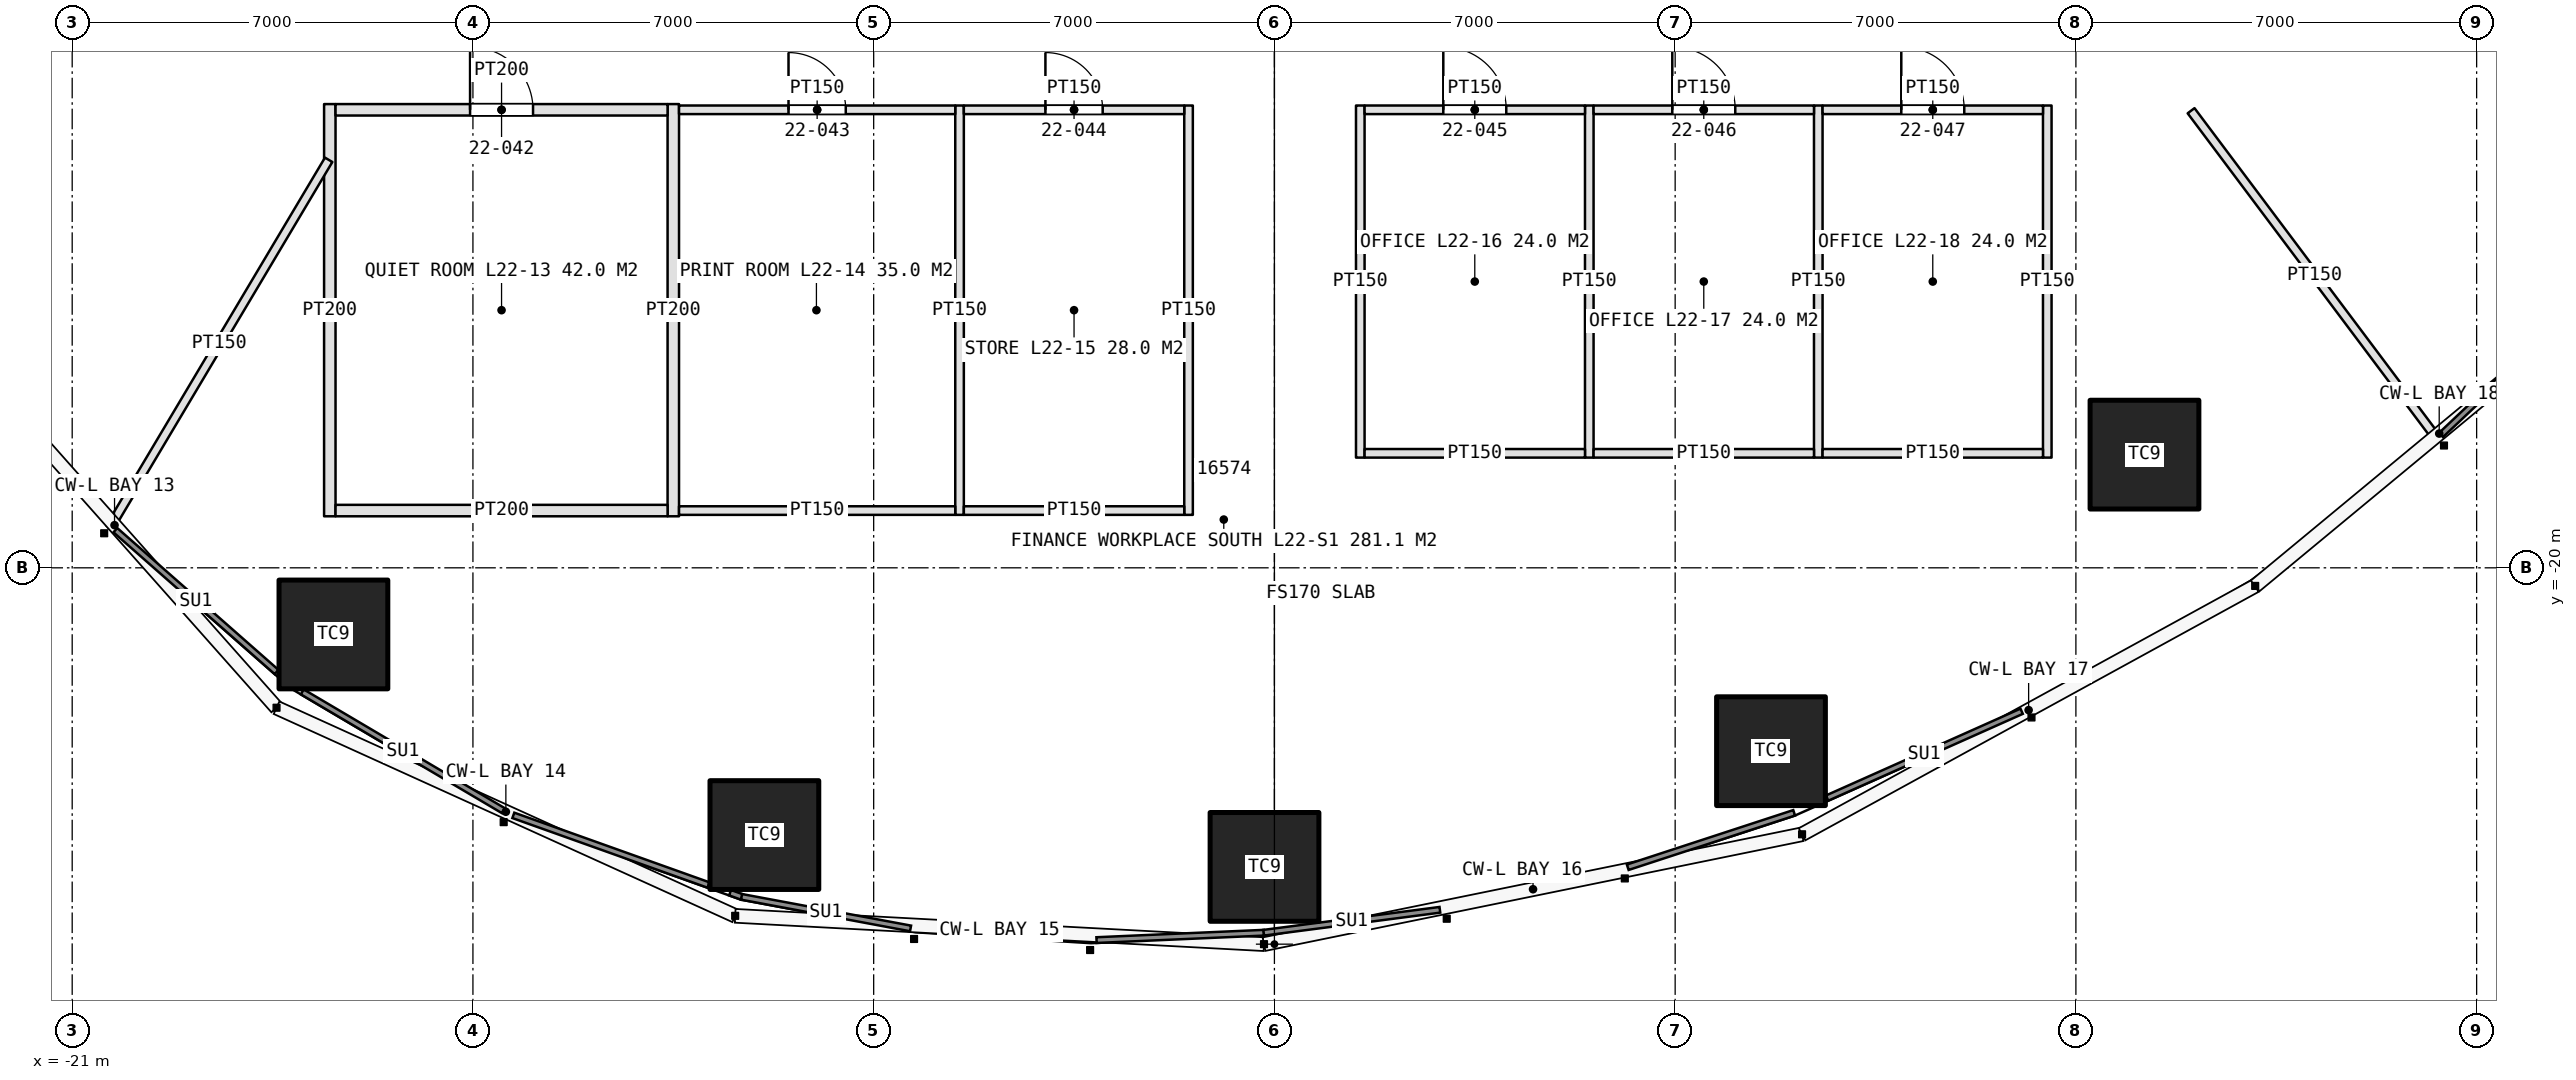
"""IFC4 building model, lengths in metres.
Left out: names, types, materials, properties, quantities, classifications, styles, units other than length and angle.
Written with IfcOpenShell. Run it as: python <this file> out.ifc"""

import sys

from ifc_helpers import new_model, si_unit, direction, frame, frame_2d, origin, origin_2d, place, context, subcontext, project, spatial, rectangle, extrude, element, fill, save


model = new_model("IFC4")
c1 = context("Model", 3, precision=1e-05, world=origin(), true_north=direction((0.0, 1.0)))
c2 = subcontext(c1, "Body", "Model", "MODEL_VIEW")
j1 = project(units=[si_unit("LENGTHUNIT", "METRE"), si_unit("PLANEANGLEUNIT", "RADIAN")], contexts=[c1])
p1 = place(None, origin())
s1 = spatial("IfcSite", under=j1, at=p1, CompositionType="ELEMENT")
p2 = place(p1, origin())
s2 = spatial("IfcBuilding", under=s1, at=p2, CompositionType="ELEMENT")
p3 = place(p2, frame((0.0, 0.0, 109.2)))
s3 = spatial("IfcBuildingStorey", under=s2, at=p3, CompositionType="ELEMENT", Elevation=109.2)
for number, where, z_axis, x_axis in (
    (1, (-16.437, -21.164, 0.0), (0.0, 0.0, 1.0), (1.0, 0.0, 0.0)),
    (2, (-8.909, -24.668, 0.0), (0.0, 0.0, 1.0), (1.0, 0.0, 0.0)),
    (3, (-0.173, -25.224, 0.0), (0.0, 0.0, 1.0), (1.0, 0.0, 0.0)),
    (4, (8.674, -23.203, 0.0), (0.0, 0.0, 1.0), (1.0, 0.0, 0.0)),
    (5, (15.198, -18.023, 0.0), (0.0, 0.0, 1.0), (1.0, 0.0, 0.0)),
):
    element("IfcColumn", number, at=place(p3, frame(where, z_axis=z_axis, x_axis=x_axis)), inside=s3, PredefinedType="COLUMN", context=c2, shape_type="SweptSolid", body=[
        extrude(rectangle(XDim=1.9, YDim=1.9, at=origin_2d()), origin(), (0.0, 0.0, 1.0), 4.2),
    ])
for number, where, z_axis, x_axis in (
    (6, (-16.5, -11.9, 0.0), (0.0, 0.0, 1.0), (0.0, -1.0, 0.0)),
    (7, (-10.5, -11.9, 0.0), (0.0, 0.0, 1.0), (0.0, -1.0, 0.0)),
):
    element("IfcWall", number, at=place(p3, frame(where, z_axis=z_axis, x_axis=x_axis)), inside=s3, PredefinedType="PARTITIONING", context=c2, shape_type="SweptSolid", body=[
        extrude(rectangle(XDim=7.2, YDim=0.2, at=frame_2d((3.6, 0.0))), origin(), (0.0, 0.0, 1.0), 3.0),
    ])
for number, where, z_axis, x_axis in (
    (8, (-5.5, -11.925, 0.0), (0.0, 0.0, 1.0), (0.0, -1.0, 0.0)),
    (9, (-1.5, -11.925, 0.0), (0.0, 0.0, 1.0), (0.0, -1.0, 0.0)),
):
    element("IfcWall", number, at=place(p3, frame(where, z_axis=z_axis, x_axis=x_axis)), inside=s3, PredefinedType="PARTITIONING", context=c2, shape_type="SweptSolid", body=[
        extrude(rectangle(XDim=7.15, YDim=0.15, at=frame_2d((3.575, 0.0))), origin(), (0.0, 0.0, 1.0), 3.0),
    ])
p4 = place(p3, frame((-16.4, -12.0, 0.0), z_axis=(0.0, 0.0, 1.0), x_axis=(1.0, 0.0, 0.0)))
e10 = element("IfcWall", 10, at=p4, inside=s3, PredefinedType="PARTITIONING", context=c2, shape_type="SweptSolid", body=[
    extrude(rectangle(XDim=5.8, YDim=0.2, at=frame_2d((2.9, 0.0))), origin(), (0.0, 0.0, 1.0), 3.0),
])
p5 = place(p4, frame((2.35, 0.0, 0.0)))
e11 = element("IfcOpeningElement", 11, at=p5, cuts=e10, PredefinedType="OPENING", context=c2, shape_type="SweptSolid", body=[
    extrude(rectangle(XDim=1.1, YDim=2.3, at=frame_2d((0.55, 1.15))), frame((0.0, 0.11, 0.0), z_axis=(0.0, -1.0, 0.0), x_axis=(1.0, 0.0, 0.0)), (0.0, 0.0, 1.0), 0.22),
])
p6 = place(p3, frame((-16.4, -19.0, 0.0), z_axis=(0.0, 0.0, 1.0), x_axis=(1.0, 0.0, 0.0)))
e12 = element("IfcWall", 12, at=p6, inside=s3, PredefinedType="PARTITIONING", context=c2, shape_type="SweptSolid", body=[
    extrude(rectangle(XDim=5.8, YDim=0.2, at=frame_2d((2.9, 0.0))), origin(), (0.0, 0.0, 1.0), 3.0),
])
p7 = place(p3, frame((-10.4, -12.0, 0.0), z_axis=(0.0, 0.0, 1.0), x_axis=(1.0, 0.0, 0.0)))
e13 = element("IfcWall", 13, at=p7, inside=s3, PredefinedType="PARTITIONING", context=c2, shape_type="SweptSolid", body=[
    extrude(rectangle(XDim=4.825, YDim=0.15, at=frame_2d((2.413, 0.0))), origin(), (0.0, 0.0, 1.0), 3.0),
])
p8 = place(p7, frame((1.913, 0.0, 0.0)))
e14 = element("IfcOpeningElement", 14, at=p8, cuts=e13, PredefinedType="OPENING", context=c2, shape_type="SweptSolid", body=[
    extrude(rectangle(XDim=1.0, YDim=2.2, at=frame_2d((0.5, 1.1))), frame((0.0, 0.085, 0.0), z_axis=(0.0, -1.0, 0.0), x_axis=(1.0, 0.0, 0.0)), (0.0, 0.0, 1.0), 0.17),
])
p9 = place(p3, frame((-10.4, -19.0, 0.0), z_axis=(0.0, 0.0, 1.0), x_axis=(1.0, 0.0, 0.0)))
e15 = element("IfcWall", 15, at=p9, inside=s3, PredefinedType="PARTITIONING", context=c2, shape_type="SweptSolid", body=[
    extrude(rectangle(XDim=4.825, YDim=0.15, at=frame_2d((2.413, 0.0))), origin(), (0.0, 0.0, 1.0), 3.0),
])
p10 = place(p3, frame((-5.425, -12.0, 0.0), z_axis=(0.0, 0.0, 1.0), x_axis=(1.0, 0.0, 0.0)))
e16 = element("IfcWall", 16, at=p10, inside=s3, PredefinedType="PARTITIONING", context=c2, shape_type="SweptSolid", body=[
    extrude(rectangle(XDim=3.85, YDim=0.15, at=frame_2d((1.925, 0.0))), origin(), (0.0, 0.0, 1.0), 3.0),
])
p11 = place(p10, frame((1.425, 0.0, 0.0)))
e17 = element("IfcOpeningElement", 17, at=p11, cuts=e16, PredefinedType="OPENING", context=c2, shape_type="SweptSolid", body=[
    extrude(rectangle(XDim=1.0, YDim=2.2, at=frame_2d((0.5, 1.1))), frame((0.0, 0.085, 0.0), z_axis=(0.0, -1.0, 0.0), x_axis=(1.0, 0.0, 0.0)), (0.0, 0.0, 1.0), 0.17),
])
p12 = place(p3, frame((-5.425, -19.0, 0.0), z_axis=(0.0, 0.0, 1.0), x_axis=(1.0, 0.0, 0.0)))
e18 = element("IfcWall", 18, at=p12, inside=s3, PredefinedType="PARTITIONING", context=c2, shape_type="SweptSolid", body=[
    extrude(rectangle(XDim=3.85, YDim=0.15, at=frame_2d((1.925, 0.0))), origin(), (0.0, 0.0, 1.0), 3.0),
])
for number, where, z_axis, x_axis in (
    (19, (1.5, -11.925, 0.0), (0.0, 0.0, 1.0), (0.0, -1.0, 0.0)),
    (20, (5.5, -11.925, 0.0), (0.0, 0.0, 1.0), (0.0, -1.0, 0.0)),
    (21, (9.5, -11.925, 0.0), (0.0, 0.0, 1.0), (0.0, -1.0, 0.0)),
    (22, (13.5, -11.925, 0.0), (0.0, 0.0, 1.0), (0.0, -1.0, 0.0)),
):
    element("IfcWall", number, at=place(p3, frame(where, z_axis=z_axis, x_axis=x_axis)), inside=s3, PredefinedType="PARTITIONING", context=c2, shape_type="SweptSolid", body=[
        extrude(rectangle(XDim=6.15, YDim=0.15, at=frame_2d((3.075, 0.0))), origin(), (0.0, 0.0, 1.0), 3.0),
    ])
p13 = place(p3, frame((1.575, -12.0, 0.0), z_axis=(0.0, 0.0, 1.0), x_axis=(1.0, 0.0, 0.0)))
e23 = element("IfcWall", 23, at=p13, inside=s3, PredefinedType="PARTITIONING", context=c2, shape_type="SweptSolid", body=[
    extrude(rectangle(XDim=3.85, YDim=0.15, at=frame_2d((1.925, 0.0))), origin(), (0.0, 0.0, 1.0), 3.0),
])
p14 = place(p13, frame((1.375, 0.0, 0.0)))
e24 = element("IfcOpeningElement", 24, at=p14, cuts=e23, PredefinedType="OPENING", context=c2, shape_type="SweptSolid", body=[
    extrude(rectangle(XDim=1.1, YDim=2.3, at=frame_2d((0.55, 1.15))), frame((0.0, 0.085, 0.0), z_axis=(0.0, -1.0, 0.0), x_axis=(1.0, 0.0, 0.0)), (0.0, 0.0, 1.0), 0.17),
])
p15 = place(p3, frame((1.575, -18.0, 0.0), z_axis=(0.0, 0.0, 1.0), x_axis=(1.0, 0.0, 0.0)))
e25 = element("IfcWall", 25, at=p15, inside=s3, PredefinedType="PARTITIONING", context=c2, shape_type="SweptSolid", body=[
    extrude(rectangle(XDim=3.85, YDim=0.15, at=frame_2d((1.925, 0.0))), origin(), (0.0, 0.0, 1.0), 3.0),
])
p16 = place(p3, frame((5.575, -12.0, 0.0), z_axis=(0.0, 0.0, 1.0), x_axis=(1.0, 0.0, 0.0)))
e26 = element("IfcWall", 26, at=p16, inside=s3, PredefinedType="PARTITIONING", context=c2, shape_type="SweptSolid", body=[
    extrude(rectangle(XDim=3.85, YDim=0.15, at=frame_2d((1.925, 0.0))), origin(), (0.0, 0.0, 1.0), 3.0),
])
p17 = place(p16, frame((1.375, 0.0, 0.0)))
e27 = element("IfcOpeningElement", 27, at=p17, cuts=e26, PredefinedType="OPENING", context=c2, shape_type="SweptSolid", body=[
    extrude(rectangle(XDim=1.1, YDim=2.3, at=frame_2d((0.55, 1.15))), frame((0.0, 0.085, 0.0), z_axis=(0.0, -1.0, 0.0), x_axis=(1.0, 0.0, 0.0)), (0.0, 0.0, 1.0), 0.17),
])
p18 = place(p3, frame((5.575, -18.0, 0.0), z_axis=(0.0, 0.0, 1.0), x_axis=(1.0, 0.0, 0.0)))
e28 = element("IfcWall", 28, at=p18, inside=s3, PredefinedType="PARTITIONING", context=c2, shape_type="SweptSolid", body=[
    extrude(rectangle(XDim=3.85, YDim=0.15, at=frame_2d((1.925, 0.0))), origin(), (0.0, 0.0, 1.0), 3.0),
])
p19 = place(p3, frame((9.575, -12.0, 0.0), z_axis=(0.0, 0.0, 1.0), x_axis=(1.0, 0.0, 0.0)))
e29 = element("IfcWall", 29, at=p19, inside=s3, PredefinedType="PARTITIONING", context=c2, shape_type="SweptSolid", body=[
    extrude(rectangle(XDim=3.85, YDim=0.15, at=frame_2d((1.925, 0.0))), origin(), (0.0, 0.0, 1.0), 3.0),
])
p20 = place(p19, frame((1.375, 0.0, 0.0)))
e30 = element("IfcOpeningElement", 30, at=p20, cuts=e29, PredefinedType="OPENING", context=c2, shape_type="SweptSolid", body=[
    extrude(rectangle(XDim=1.1, YDim=2.3, at=frame_2d((0.55, 1.15))), frame((0.0, 0.085, 0.0), z_axis=(0.0, -1.0, 0.0), x_axis=(1.0, 0.0, 0.0)), (0.0, 0.0, 1.0), 0.17),
])
p21 = place(p3, frame((9.575, -18.0, 0.0), z_axis=(0.0, 0.0, 1.0), x_axis=(1.0, 0.0, 0.0)))
e31 = element("IfcWall", 31, at=p21, inside=s3, PredefinedType="PARTITIONING", context=c2, shape_type="SweptSolid", body=[
    extrude(rectangle(XDim=3.85, YDim=0.15, at=frame_2d((1.925, 0.0))), origin(), (0.0, 0.0, 1.0), 3.0),
])
p22 = place(p3, frame((-16.52, -12.874, 0.0), z_axis=(0.0, 0.0, 1.0), x_axis=(-0.511514296511, -0.85927476657, 0.0)))
e32 = element("IfcWall", 32, at=p22, inside=s3, PredefinedType="PARTITIONING", context=c2, shape_type="SweptSolid", body=[
    extrude(rectangle(XDim=7.474, YDim=0.15, at=frame_2d((3.737, 0.0))), origin(), (0.0, 0.0, 1.0), 3.0),
])
p23 = place(p3, frame((16.012, -12.016, 0.0), z_axis=(0.0, 0.0, 1.0), x_axis=(0.600059749679, -0.799955184254, 0.0)))
e33 = element("IfcWall", 33, at=p23, inside=s3, PredefinedType="PARTITIONING", context=c2, shape_type="SweptSolid", body=[
    extrude(rectangle(XDim=7.191, YDim=0.15, at=frame_2d((3.596, 0.0))), origin(), (0.0, 0.0, 1.0), 3.0),
])
p24 = place(p5, origin())
e34 = element("IfcDoor", 34, at=p24, inside=s3, OperationType="SINGLE_SWING_LEFT", PredefinedType="DOOR", context=c2, shape_type="SweptSolid", body=[
    extrude(rectangle(XDim=1.1, YDim=2.3, at=frame_2d((0.55, 1.15))), frame((0.0, 0.025, 0.0), z_axis=(0.0, -1.0, 0.0), x_axis=(1.0, 0.0, 0.0)), (0.0, 0.0, 1.0), 0.05),
])
fill(e11, e34)
p25 = place(p8, origin())
e35 = element("IfcDoor", 35, at=p25, inside=s3, OperationType="SINGLE_SWING_LEFT", PredefinedType="DOOR", context=c2, shape_type="SweptSolid", body=[
    extrude(rectangle(XDim=1.0, YDim=2.2, at=frame_2d((0.5, 1.1))), frame((0.0, 0.025, 0.0), z_axis=(0.0, -1.0, 0.0), x_axis=(1.0, 0.0, 0.0)), (0.0, 0.0, 1.0), 0.05),
])
fill(e14, e35)
p26 = place(p11, origin())
e36 = element("IfcDoor", 36, at=p26, inside=s3, OperationType="SINGLE_SWING_LEFT", PredefinedType="DOOR", context=c2, shape_type="SweptSolid", body=[
    extrude(rectangle(XDim=1.0, YDim=2.2, at=frame_2d((0.5, 1.1))), frame((0.0, 0.025, 0.0), z_axis=(0.0, -1.0, 0.0), x_axis=(1.0, 0.0, 0.0)), (0.0, 0.0, 1.0), 0.05),
])
fill(e17, e36)
p27 = place(p14, origin())
e37 = element("IfcDoor", 37, at=p27, inside=s3, OperationType="SINGLE_SWING_LEFT", PredefinedType="DOOR", context=c2, shape_type="SweptSolid", body=[
    extrude(rectangle(XDim=1.1, YDim=2.3, at=frame_2d((0.55, 1.15))), frame((0.0, 0.025, 0.0), z_axis=(0.0, -1.0, 0.0), x_axis=(1.0, 0.0, 0.0)), (0.0, 0.0, 1.0), 0.05),
])
fill(e24, e37)
p28 = place(p17, origin())
e38 = element("IfcDoor", 38, at=p28, inside=s3, OperationType="SINGLE_SWING_LEFT", PredefinedType="DOOR", context=c2, shape_type="SweptSolid", body=[
    extrude(rectangle(XDim=1.1, YDim=2.3, at=frame_2d((0.55, 1.15))), frame((0.0, 0.025, 0.0), z_axis=(0.0, -1.0, 0.0), x_axis=(1.0, 0.0, 0.0)), (0.0, 0.0, 1.0), 0.05),
])
fill(e27, e38)
p29 = place(p20, origin())
e39 = element("IfcDoor", 39, at=p29, inside=s3, OperationType="SINGLE_SWING_LEFT", PredefinedType="DOOR", context=c2, shape_type="SweptSolid", body=[
    extrude(rectangle(XDim=1.1, YDim=2.3, at=frame_2d((0.55, 1.15))), frame((0.0, 0.025, 0.0), z_axis=(0.0, -1.0, 0.0), x_axis=(1.0, 0.0, 0.0)), (0.0, 0.0, 1.0), 0.05),
])
fill(e30, e39)
save(model, sys.argv[1])
